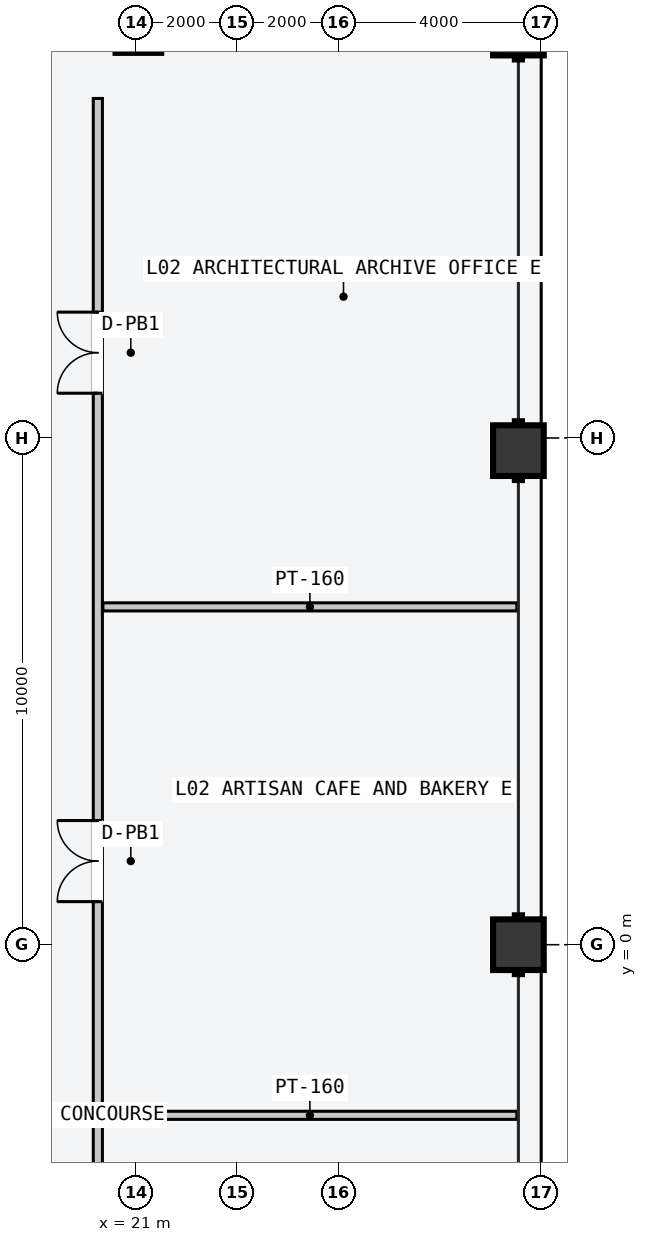
"""IFC4 building model, lengths in metres.
Left out: names, types, materials, properties, quantities, classifications, styles, units other than length and angle.
Written with IfcOpenShell. Run it as: python <this file> out.ifc"""

import sys

from ifc_helpers import new_model, si_unit, direction, frame, frame_2d, origin, origin_2d, place, context, subcontext, project, spatial, rectangle, hollow_rectangle, extrude, element, fill, save


model = new_model("IFC4")
c1 = context("Model", 3, precision=1e-05, world=origin(), true_north=direction((0.0, 1.0)))
c2 = subcontext(c1, "Body", "Model", "MODEL_VIEW")
j1 = project(units=[si_unit("LENGTHUNIT", "METRE"), si_unit("PLANEANGLEUNIT", "RADIAN")], contexts=[c1])
p1 = place(None, origin())
s1 = spatial("IfcSite", under=j1, at=p1, CompositionType="ELEMENT")
p2 = place(p1, origin())
s2 = spatial("IfcBuilding", under=s1, at=p2, CompositionType="ELEMENT")
p3 = place(p2, frame((0.0, 0.0, 9.6)))
s3 = spatial("IfcBuildingStorey", under=s2, at=p3, CompositionType="ELEMENT", Elevation=9.6)
p4 = place(p3, frame((21.05, 18.05, 0.0), z_axis=(0.0, 0.0, 1.0), x_axis=(1.0, 0.0, 0.0)))
e1 = element("IfcColumn", 1, at=p4, inside=s3, PredefinedType="COLUMN", context=c2, shape_type="SweptSolid", body=[
    extrude(hollow_rectangle(XDim=0.9, YDim=0.9, WallThickness=0.045, at=origin_2d()), origin(), (0.0, 0.0, 1.0), 4.8),
])
for number, where, z_axis, x_axis in (
    (2, (28.55, 0.0, 0.0), (0.0, 0.0, 1.0), (0.0, 1.0, 0.0)),
    (3, (28.55, 9.75, 0.0), (0.0, 0.0, 1.0), (0.0, 1.0, 0.0)),
    (4, (28.55, 18.05, 0.0), (0.0, 0.0, 1.0), (0.0, 1.0, 0.0)),
):
    element("IfcColumn", number, at=place(p3, frame(where, z_axis=z_axis, x_axis=x_axis)), inside=s3, PredefinedType="COLUMN", context=c2, shape_type="SweptSolid", body=[
        extrude(hollow_rectangle(XDim=1.0, YDim=1.0, WallThickness=0.05, at=origin_2d()), origin(), (0.0, 0.0, 1.0), 4.8),
    ])
p5 = place(p3, frame((20.35, -3.367, 0.0), z_axis=(0.0, 0.0, 1.0), x_axis=(1.0, 0.0, 0.0)))
e5 = element("IfcWall", 5, at=p5, inside=s3, PredefinedType="PARTITIONING", context=c2, shape_type="SweptSolid", body=[
    extrude(rectangle(XDim=8.17, YDim=0.16, at=frame_2d((4.085, 0.0))), origin(), (0.0, 0.0, 1.0), 4.08),
])
p6 = place(p3, frame((20.35, 6.667, 0.0), z_axis=(0.0, 0.0, 1.0), x_axis=(1.0, 0.0, 0.0)))
e6 = element("IfcWall", 6, at=p6, inside=s3, PredefinedType="PARTITIONING", context=c2, shape_type="SweptSolid", body=[
    extrude(rectangle(XDim=8.17, YDim=0.16, at=frame_2d((4.085, 0.0))), origin(), (0.0, 0.0, 1.0), 4.58),
])
p7 = place(p3, frame((20.25, -20.6, 0.0), z_axis=(0.0, 0.0, 1.0), x_axis=(0.0, 1.0, 0.0)))
e7 = element("IfcWall", 7, at=p7, inside=s3, PredefinedType="PARTITIONING", context=c2, shape_type="SweptSolid", body=[
    extrude(rectangle(XDim=37.3, YDim=0.18, at=frame_2d((18.65, 0.0))), origin(), (0.0, 0.0, 1.0), 4.58),
])
p8 = place(p7, frame((11.417, 0.0, 0.0)))
e8 = element("IfcOpeningElement", 8, at=p8, cuts=e7, PredefinedType="OPENING", context=c2, shape_type="SweptSolid", body=[
    extrude(rectangle(XDim=1.6, YDim=2.3, at=frame_2d((0.8, 1.15))), frame((0.0, 0.1, 0.0), z_axis=(0.0, -1.0, 0.0), x_axis=(1.0, 0.0, 0.0)), (0.0, 0.0, 1.0), 0.2),
])
p9 = place(p7, frame((21.45, 0.0, 0.0)))
e9 = element("IfcOpeningElement", 9, at=p9, cuts=e7, PredefinedType="OPENING", context=c2, shape_type="SweptSolid", body=[
    extrude(rectangle(XDim=1.6, YDim=2.3, at=frame_2d((0.8, 1.15))), frame((0.0, 0.1, 0.0), z_axis=(0.0, -1.0, 0.0), x_axis=(1.0, 0.0, 0.0)), (0.0, 0.0, 1.0), 0.2),
])
p10 = place(p7, frame((31.483, 0.0, 0.0)))
e10 = element("IfcOpeningElement", 10, at=p10, cuts=e7, PredefinedType="OPENING", context=c2, shape_type="SweptSolid", body=[
    extrude(rectangle(XDim=1.6, YDim=2.3, at=frame_2d((0.8, 1.15))), frame((0.0, 0.1, 0.0), z_axis=(0.0, -1.0, 0.0), x_axis=(1.0, 0.0, 0.0)), (0.0, 0.0, 1.0), 0.2),
])
p11 = place(p9, origin())
e11 = element("IfcDoor", 11, at=p11, inside=s3, OperationType="DOUBLE_DOOR_SINGLE_SWING", PredefinedType="DOOR", context=c2, shape_type="SweptSolid", body=[
    extrude(rectangle(XDim=1.6, YDim=2.3, at=frame_2d((0.8, 1.15))), frame((0.0, 0.025, 0.0), z_axis=(0.0, -1.0, 0.0), x_axis=(1.0, 0.0, 0.0)), (0.0, 0.0, 1.0), 0.05),
])
fill(e9, e11)
p12 = place(p10, origin())
e12 = element("IfcDoor", 12, at=p12, inside=s3, OperationType="DOUBLE_DOOR_SINGLE_SWING", PredefinedType="DOOR", context=c2, shape_type="SweptSolid", body=[
    extrude(rectangle(XDim=1.6, YDim=2.3, at=frame_2d((0.8, 1.15))), frame((0.0, 0.025, 0.0), z_axis=(0.0, -1.0, 0.0), x_axis=(1.0, 0.0, 0.0)), (0.0, 0.0, 1.0), 0.05),
])
fill(e10, e12)
save(model, sys.argv[1])
